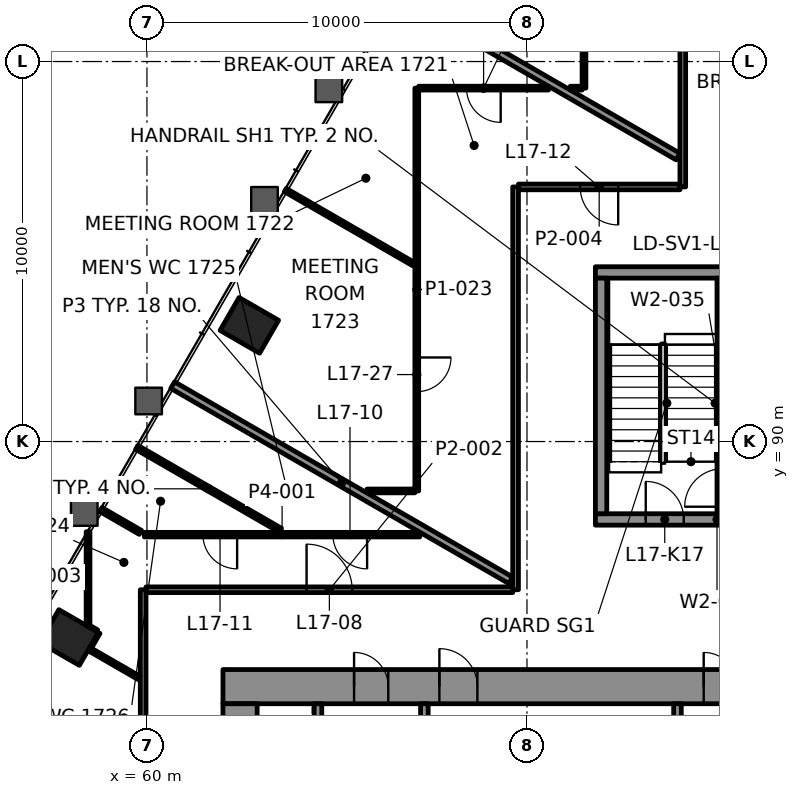
"""IFC4 building model, lengths in metres.
Left out: names, types, materials, properties, quantities, classifications, styles, units other than length and angle.
Written with IfcOpenShell. Run it as: python <this file> out.ifc"""

import sys

from ifc_helpers import new_model, si_unit, direction, frame, frame_2d, origin, origin_2d, place, context, subcontext, project, spatial, rectangle, extrude, element, fill, save


model = new_model("IFC4")
c1 = context("Model", 3, precision=1e-05, world=origin(), true_north=direction((0.0, 1.0)))
c2 = subcontext(c1, "Body", "Model", "MODEL_VIEW")
j1 = project(units=[si_unit("LENGTHUNIT", "METRE"), si_unit("PLANEANGLEUNIT", "RADIAN")], contexts=[c1])
p1 = place(None, origin())
s1 = spatial("IfcSite", under=j1, at=p1, CompositionType="ELEMENT")
p2 = place(p1, origin())
s2 = spatial("IfcBuilding", under=s1, at=p2, CompositionType="ELEMENT")
p3 = place(p2, frame((0.0, 0.0, 77.8)))
s3 = spatial("IfcBuildingStorey", under=s2, at=p3, CompositionType="ELEMENT", Elevation=77.8)
for number, where, z_axis, x_axis in (
    (1, (62.694, 93.057, -0.0), (0.0, 0.0, 1.0), (-0.5, -0.866, 0.0)),
    (2, (57.951, 84.843, -0.0), (0.0, 0.0, 1.0), (-0.5, -0.866, 0.0)),
):
    element("IfcColumn", number, at=place(p3, frame(where, z_axis=z_axis, x_axis=x_axis)), inside=s3, PredefinedType="COLUMN", context=c2, shape_type="SweptSolid", body=[
        extrude(rectangle(XDim=1.0, YDim=1.2, at=origin_2d()), origin(), (0.0, 0.0, 1.0), 4.2),
    ])
p4 = place(p3, frame((62.0, 83.55, 0.0), z_axis=(0.0, 0.0, 1.0), x_axis=(1.0, 0.0, 0.0)))
e3 = element("IfcWall", 3, at=p4, inside=s3, PredefinedType="SHEAR", context=c2, shape_type="SweptSolid", body=[
    extrude(rectangle(XDim=26.0, YDim=0.9, at=frame_2d((13.0, 0.0))), origin(), (0.0, 0.0, 1.0), 4.0),
])
p5 = place(p4, frame((5.695, 0.0, 0.0)))
e4 = element("IfcOpeningElement", 4, at=p5, cuts=e3, PredefinedType="OPENING", context=c2, shape_type="SweptSolid", body=[
    extrude(rectangle(XDim=1.0, YDim=2.1, at=frame_2d((0.5, 1.05))), frame((0.0, 0.46, 0.0), z_axis=(0.0, -1.0, 0.0), x_axis=(1.0, 0.0, 0.0)), (0.0, 0.0, 1.0), 0.92),
])
p6 = place(p4, frame((19.505, 0.0, 0.0)))
e5 = element("IfcOpeningElement", 5, at=p6, cuts=e3, PredefinedType="OPENING", context=c2, shape_type="SweptSolid", body=[
    extrude(rectangle(XDim=1.0, YDim=2.1, at=frame_2d((0.5, 1.05))), frame((0.0, 0.46, 0.0), z_axis=(0.0, -1.0, 0.0), x_axis=(1.0, 0.0, 0.0)), (0.0, 0.0, 1.0), 0.92),
])
p7 = place(p4, frame((3.45, 0.0, 0.0)))
e6 = element("IfcOpeningElement", 6, at=p7, cuts=e3, PredefinedType="OPENING", context=c2, shape_type="SweptSolid", body=[
    extrude(rectangle(XDim=0.9, YDim=2.1, at=frame_2d((0.45, 1.05))), frame((0.0, 0.46, 0.0), z_axis=(0.0, -1.0, 0.0), x_axis=(1.0, 0.0, 0.0)), (0.0, 0.0, 1.0), 0.92),
])
p8 = place(p4, frame((12.65, 0.0, 0.0)))
e7 = element("IfcOpeningElement", 7, at=p8, cuts=e3, PredefinedType="OPENING", context=c2, shape_type="SweptSolid", body=[
    extrude(rectangle(XDim=0.9, YDim=2.1, at=frame_2d((0.45, 1.05))), frame((0.0, 0.46, 0.0), z_axis=(0.0, -1.0, 0.0), x_axis=(1.0, 0.0, 0.0)), (0.0, 0.0, 1.0), 0.92),
])
p9 = place(p4, frame((22.55, 0.0, 0.0)))
e8 = element("IfcOpeningElement", 8, at=p9, cuts=e3, PredefinedType="OPENING", context=c2, shape_type="SweptSolid", body=[
    extrude(rectangle(XDim=0.9, YDim=2.1, at=frame_2d((0.45, 1.05))), frame((0.0, 0.46, 0.0), z_axis=(0.0, -1.0, 0.0), x_axis=(1.0, 0.0, 0.0)), (0.0, 0.0, 1.0), 0.92),
])
p10 = place(p3, frame((62.45, 66.9, 0.0), z_axis=(0.0, 0.0, 1.0), x_axis=(0.0, 1.0, 0.0)))
e9 = element("IfcWall", 9, at=p10, inside=s3, PredefinedType="SHEAR", context=c2, shape_type="SweptSolid", body=[
    extrude(rectangle(XDim=16.2, YDim=0.9, at=frame_2d((8.1, 0.0))), origin(), (0.0, 0.0, 1.0), 4.0),
])
p11 = place(p10, frame((5.5, 0.0, 0.0)))
e10 = element("IfcOpeningElement", 10, at=p11, cuts=e9, PredefinedType="OPENING", context=c2, shape_type="SweptSolid", body=[
    extrude(rectangle(XDim=1.8, YDim=2.1, at=frame_2d((0.9, 1.05))), frame((0.0, 0.46, 0.0), z_axis=(0.0, -1.0, 0.0), x_axis=(1.0, 0.0, 0.0)), (0.0, 0.0, 1.0), 0.92),
])
p12 = place(p3, frame((71.8, 87.95, 0.0), z_axis=(0.0, 0.0, 1.0), x_axis=(1.0, 0.0, 0.0)))
e11 = element("IfcWall", 11, at=p12, inside=s3, PredefinedType="SHEAR", context=c2, shape_type="SweptSolid", body=[
    extrude(rectangle(XDim=6.4, YDim=0.3, at=frame_2d((3.2, 0.0))), origin(), (0.0, 0.0, 1.0), 4.0),
])
p13 = place(p12, frame((1.325, 0.0, 0.0)))
e12 = element("IfcOpeningElement", 12, at=p13, cuts=e11, PredefinedType="OPENING", context=c2, shape_type="SweptSolid", body=[
    extrude(rectangle(XDim=1.0, YDim=2.1, at=frame_2d((0.5, 1.05))), frame((0.0, 0.16, 0.0), z_axis=(0.0, -1.0, 0.0), x_axis=(1.0, 0.0, 0.0)), (0.0, 0.0, 1.0), 0.32),
])
p14 = place(p12, frame((4.125, 0.0, 0.0)))
e13 = element("IfcOpeningElement", 13, at=p14, cuts=e11, PredefinedType="OPENING", context=c2, shape_type="SweptSolid", body=[
    extrude(rectangle(XDim=1.2, YDim=2.1, at=frame_2d((0.6, 1.05))), frame((0.0, 0.16, 0.0), z_axis=(0.0, -1.0, 0.0), x_axis=(1.0, 0.0, 0.0)), (0.0, 0.0, 1.0), 0.32),
])
p15 = place(p3, frame((71.8, 94.45, 0.0), z_axis=(0.0, 0.0, 1.0), x_axis=(1.0, 0.0, 0.0)))
e14 = element("IfcWall", 14, at=p15, inside=s3, PredefinedType="SHEAR", context=c2, shape_type="SweptSolid", body=[
    extrude(rectangle(XDim=6.4, YDim=0.3, at=frame_2d((3.2, 0.0))), origin(), (0.0, 0.0, 1.0), 4.0),
])
p16 = place(p3, frame((71.95, 88.1, 0.0), z_axis=(0.0, 0.0, 1.0), x_axis=(0.0, 1.0, 0.0)))
e15 = element("IfcWall", 15, at=p16, inside=s3, PredefinedType="SHEAR", context=c2, shape_type="SweptSolid", body=[
    extrude(rectangle(XDim=6.2, YDim=0.3, at=frame_2d((3.1, 0.0))), origin(), (0.0, 0.0, 1.0), 4.0),
])
p17 = place(p3, frame((75.15, 88.1, 0.0), z_axis=(0.0, 0.0, 1.0), x_axis=(0.0, 1.0, 0.0)))
e16 = element("IfcWall", 16, at=p17, inside=s3, PredefinedType="SHEAR", context=c2, shape_type="SweptSolid", body=[
    extrude(rectangle(XDim=6.2, YDim=0.3, at=frame_2d((3.1, 0.0))), origin(), (0.0, 0.0, 1.0), 4.0),
])
p18 = place(p17, frame((0.185, 0.0, 0.0)))
e17 = element("IfcOpeningElement", 17, at=p18, cuts=e16, PredefinedType="OPENING", context=c2, shape_type="SweptSolid", body=[
    extrude(rectangle(XDim=1.0, YDim=2.1, at=frame_2d((0.5, 1.05))), frame((0.0, 0.16, 0.0), z_axis=(0.0, -1.0, 0.0), x_axis=(1.0, 0.0, 0.0)), (0.0, 0.0, 1.0), 0.32),
])
p19 = place(p3, frame((59.976, 86.1, 0.0), z_axis=(0.0, 0.0, 1.0), x_axis=(1.0, 0.0, 0.0)))
e18 = element("IfcWall", 18, at=p19, inside=s3, PredefinedType="PARTITIONING", context=c2, shape_type="SweptSolid", body=[
    extrude(rectangle(XDim=9.649, YDim=0.15, at=frame_2d((4.825, 0.0))), origin(), (0.0, 0.0, 1.0), 3.4),
])
p20 = place(p19, frame((4.225, 0.0, 0.0)))
e19 = element("IfcOpeningElement", 19, at=p20, cuts=e18, PredefinedType="OPENING", context=c2, shape_type="SweptSolid", body=[
    extrude(rectangle(XDim=1.2, YDim=2.1, at=frame_2d((0.6, 1.05))), frame((0.0, 0.085, 0.0), z_axis=(0.0, -1.0, 0.0), x_axis=(1.0, 0.0, 0.0)), (0.0, 0.0, 1.0), 0.17),
])
p21 = place(p3, frame((67.181, 87.55, 0.0), z_axis=(0.0, 0.0, 1.0), x_axis=(-1.0, 0.0, 0.0)))
e20 = element("IfcWall", 20, at=p21, inside=s3, PredefinedType="PARTITIONING", context=c2, shape_type="SweptSolid", body=[
    extrude(rectangle(XDim=7.249, YDim=0.12, at=frame_2d((3.625, 0.0))), origin(), (0.0, 0.0, 1.0), 3.4),
])
p22 = place(p21, frame((1.388, 0.0, 0.0)))
e21 = element("IfcOpeningElement", 21, at=p22, cuts=e20, PredefinedType="OPENING", context=c2, shape_type="SweptSolid", body=[
    extrude(rectangle(XDim=0.9, YDim=2.1, at=frame_2d((0.45, 1.05))), frame((0.0, 0.07, 0.0), z_axis=(0.0, -1.0, 0.0), x_axis=(1.0, 0.0, 0.0)), (0.0, 0.0, 1.0), 0.14),
])
p23 = place(p21, frame((4.807, 0.0, 0.0)))
e22 = element("IfcOpeningElement", 22, at=p23, cuts=e20, PredefinedType="OPENING", context=c2, shape_type="SweptSolid", body=[
    extrude(rectangle(XDim=0.9, YDim=2.1, at=frame_2d((0.45, 1.05))), frame((0.0, 0.07, 0.0), z_axis=(0.0, -1.0, 0.0), x_axis=(1.0, 0.0, 0.0)), (0.0, 0.0, 1.0), 0.14),
])
p24 = place(p3, frame((65.789, 88.7, 0.0), z_axis=(0.0, 0.0, 1.0), x_axis=(1.0, 0.0, 0.0)))
e23 = element("IfcWall", 23, at=p24, inside=s3, PredefinedType="PARTITIONING", context=c2, shape_type="SweptSolid", body=[
    extrude(rectangle(XDim=1.261, YDim=0.1, at=frame_2d((0.631, 0.0))), origin(), (0.0, 0.0, 1.0), 3.4),
])
p25 = place(p3, frame((74.025, 96.7, 0.0), z_axis=(0.0, 0.0, 1.0), x_axis=(-1.0, 0.0, 0.0)))
e24 = element("IfcWall", 24, at=p25, inside=s3, PredefinedType="PARTITIONING", context=c2, shape_type="SweptSolid", body=[
    extrude(rectangle(XDim=4.25, YDim=0.15, at=frame_2d((2.125, 0.0))), origin(), (0.0, 0.0, 1.0), 3.4),
])
p26 = place(p25, frame((1.625, 0.0, 0.0)))
e25 = element("IfcOpeningElement", 25, at=p26, cuts=e24, PredefinedType="OPENING", context=c2, shape_type="SweptSolid", body=[
    extrude(rectangle(XDim=1.0, YDim=2.1, at=frame_2d((0.5, 1.05))), frame((0.0, 0.085, 0.0), z_axis=(0.0, -1.0, 0.0), x_axis=(1.0, 0.0, 0.0)), (0.0, 0.0, 1.0), 0.17),
])
p27 = place(p3, frame((70.567, 99.3, 0.0), z_axis=(0.0, 0.0, 1.0), x_axis=(-1.0, 0.0, 0.0)))
e26 = element("IfcWall", 26, at=p27, inside=s3, PredefinedType="PARTITIONING", context=c2, shape_type="SweptSolid", body=[
    extrude(rectangle(XDim=3.417, YDim=0.1, at=frame_2d((1.708, 0.0))), origin(), (0.0, 0.0, 1.0), 3.4),
])
p28 = place(p27, frame((1.258, 0.0, 0.0)))
e27 = element("IfcOpeningElement", 27, at=p28, cuts=e26, PredefinedType="OPENING", context=c2, shape_type="SweptSolid", body=[
    extrude(rectangle(XDim=0.9, YDim=2.1, at=frame_2d((0.45, 1.05))), frame((0.0, 0.06, 0.0), z_axis=(0.0, -1.0, 0.0), x_axis=(1.0, 0.0, 0.0)), (0.0, 0.0, 1.0), 0.12),
])
p29 = place(p3, frame((58.496, 84.587, 0.0), z_axis=(0.0, 0.0, 1.0), x_axis=(0.500114568548, 0.865959247497, 0.0)))
e28 = element("IfcWall", 28, at=p29, inside=s3, PredefinedType="PARTITIONING", context=c2, shape_type="SweptSolid", body=[
    extrude(rectangle(XDim=0.449, YDim=0.1, at=frame_2d((0.225, 0.0))), origin(), (0.0, 0.0, 1.0), 3.4),
])
p30 = place(p3, frame((74.1, 96.7, 0.0), z_axis=(0.0, 0.0, 1.0), x_axis=(0.0, 1.0, 0.0)))
e29 = element("IfcWall", 29, at=p30, inside=s3, PredefinedType="PARTITIONING", context=c2, shape_type="SweptSolid", body=[
    extrude(rectangle(XDim=9.736, YDim=0.15, at=frame_2d((4.868, 0.0))), origin(), (0.0, 0.0, 1.0), 3.4),
])
p31 = place(p30, frame((4.629, 0.0, 0.0)))
e30 = element("IfcOpeningElement", 30, at=p31, cuts=e29, PredefinedType="OPENING", context=c2, shape_type="SweptSolid", body=[
    extrude(rectangle(XDim=1.0, YDim=2.1, at=frame_2d((0.5, 1.05))), frame((0.0, 0.085, 0.0), z_axis=(0.0, -1.0, 0.0), x_axis=(1.0, 0.0, 0.0)), (0.0, 0.0, 1.0), 0.17),
])
p32 = place(p3, frame((71.5, 104.801, 0.0), z_axis=(0.0, 0.0, 1.0), x_axis=(0.0, -1.0, 0.0)))
e31 = element("IfcWall", 31, at=p32, inside=s3, PredefinedType="PARTITIONING", context=c2, shape_type="SweptSolid", body=[
    extrude(rectangle(XDim=5.501, YDim=0.1, at=frame_2d((2.75, 0.0))), origin(), (0.0, 0.0, 1.0), 3.4),
])
p33 = place(p32, frame((2.301, 0.0, 0.0)))
e32 = element("IfcOpeningElement", 32, at=p33, cuts=e31, PredefinedType="OPENING", context=c2, shape_type="SweptSolid", body=[
    extrude(rectangle(XDim=0.9, YDim=2.1, at=frame_2d((0.45, 1.05))), frame((0.0, 0.06, 0.0), z_axis=(0.0, -1.0, 0.0), x_axis=(1.0, 0.0, 0.0)), (0.0, 0.0, 1.0), 0.12),
])
p34 = place(p3, frame((69.7, 86.1, 0.0), z_axis=(0.0, 0.0, 1.0), x_axis=(0.0, 1.0, 0.0)))
e33 = element("IfcWall", 33, at=p34, inside=s3, PredefinedType="PARTITIONING", context=c2, shape_type="SweptSolid", body=[
    extrude(rectangle(XDim=10.6, YDim=0.15, at=frame_2d((5.3, 0.0))), origin(), (0.0, 0.0, 1.0), 3.4),
])
p35 = place(p3, frame((67.1, 99.3, 0.0), z_axis=(0.0, 0.0, 1.0), x_axis=(0.0, -1.0, 0.0)))
e34 = element("IfcWall", 34, at=p35, inside=s3, PredefinedType="PARTITIONING", context=c2, shape_type="SweptSolid", body=[
    extrude(rectangle(XDim=10.6, YDim=0.1, at=frame_2d((5.3, 0.0))), origin(), (0.0, 0.0, 1.0), 3.4),
])
p36 = place(p35, frame((7.088, 0.0, 0.0)))
e35 = element("IfcOpeningElement", 35, at=p36, cuts=e34, PredefinedType="OPENING", context=c2, shape_type="SweptSolid", body=[
    extrude(rectangle(XDim=0.9, YDim=2.1, at=frame_2d((0.45, 1.05))), frame((0.0, 0.06, 0.0), z_axis=(0.0, -1.0, 0.0), x_axis=(1.0, 0.0, 0.0)), (0.0, 0.0, 1.0), 0.12),
])
p37 = place(p3, frame((59.9, 67.321, 0.0), z_axis=(0.0, 0.0, 1.0), x_axis=(0.0, 1.0, 0.0)))
e36 = element("IfcWall", 36, at=p37, inside=s3, PredefinedType="PARTITIONING", context=c2, shape_type="SweptSolid", body=[
    extrude(rectangle(XDim=18.778, YDim=0.15, at=frame_2d((9.389, 0.0))), origin(), (0.0, 0.0, 1.0), 3.4),
])
p38 = place(p3, frame((58.45, 85.133, 0.0), z_axis=(0.0, 0.0, 1.0), x_axis=(0.0, 1.0, 0.0)))
e37 = element("IfcWall", 37, at=p38, inside=s3, PredefinedType="PARTITIONING", context=c2, shape_type="SweptSolid", body=[
    extrude(rectangle(XDim=2.494, YDim=0.1, at=frame_2d((1.247, 0.0))), origin(), (0.0, 0.0, 1.0), 3.165),
])
p39 = place(p3, frame((73.973, 97.499, 0.0), z_axis=(0.0, 0.0, 1.0), x_axis=(-0.866037536751, 0.499978984496, 0.0)))
e38 = element("IfcWall", 38, at=p39, inside=s3, PredefinedType="PARTITIONING", context=c2, shape_type="SweptSolid", body=[
    extrude(rectangle(XDim=6.948, YDim=0.2, at=frame_2d((3.474, 0.0))), origin(), (0.0, 0.0, 1.0), 3.4),
])
p40 = place(p3, frame((67.024, 94.665, 0.0), z_axis=(0.0, 0.0, 1.0), x_axis=(-0.866046116492, 0.499964122822, 0.0)))
e39 = element("IfcWall", 39, at=p40, inside=s3, PredefinedType="PARTITIONING", context=c2, shape_type="SweptSolid", body=[
    extrude(rectangle(XDim=3.906, YDim=0.1, at=frame_2d((1.953, 0.0))), origin(), (0.0, 0.0, 1.0), 3.165),
])
p41 = place(p3, frame((69.573, 86.348, 0.0), z_axis=(0.0, 0.0, 1.0), x_axis=(-0.866024495625, 0.500001572974, 0.0)))
e40 = element("IfcWall", 40, at=p41, inside=s3, PredefinedType="PARTITIONING", context=c2, shape_type="SweptSolid", body=[
    extrude(rectangle(XDim=10.272, YDim=0.2, at=frame_2d((5.136, 0.0))), origin(), (0.0, 0.0, 1.0), 3.165),
])
p42 = place(p3, frame((63.512, 87.665, 0.0), z_axis=(0.0, 0.0, 1.0), x_axis=(-0.866014185868, 0.500019429497, 0.0)))
e41 = element("IfcWall", 41, at=p42, inside=s3, PredefinedType="PARTITIONING", context=c2, shape_type="SweptSolid", body=[
    extrude(rectangle(XDim=4.365, YDim=0.12, at=frame_2d((2.182, 0.0))), origin(), (0.0, 0.0, 1.0), 3.165),
])
p43 = place(p3, frame((59.828, 87.61, 0.0), z_axis=(0.0, 0.0, 1.0), x_axis=(-0.865996090227, 0.500050769134, 0.0)))
e42 = element("IfcWall", 42, at=p43, inside=s3, PredefinedType="PARTITIONING", context=c2, shape_type="SweptSolid", body=[
    extrude(rectangle(XDim=1.202, YDim=0.12, at=frame_2d((0.601, 0.0))), origin(), (0.0, 0.0, 1.0), 3.165),
])
p44 = place(p3, frame((58.677, 85.001, 0.0), z_axis=(0.0, 0.0, 1.0), x_axis=(-0.86610613113, 0.49986015006, 0.0)))
e43 = element("IfcWall", 43, at=p44, inside=s3, PredefinedType="PARTITIONING", context=c2, shape_type="SweptSolid", body=[
    extrude(rectangle(XDim=0.205, YDim=0.1, at=frame_2d((0.102, 0.0))), origin(), (0.0, 0.0, 1.0), 3.4),
])
p45 = place(p3, frame((59.799, 83.776, 0.0), z_axis=(0.0, 0.0, 1.0), x_axis=(-0.866029087811, 0.499993619025, 0.0)))
e44 = element("IfcWall", 44, at=p45, inside=s3, PredefinedType="PARTITIONING", context=c2, shape_type="SweptSolid", body=[
    extrude(rectangle(XDim=1.533, YDim=0.1, at=frame_2d((0.766, 0.0))), origin(), (0.0, 0.0, 1.0), 3.4),
])
p46 = place(p3, frame((71.14, 99.3, 0.0), z_axis=(0.0, 0.0, 1.0), x_axis=(1.0, 0.0, 0.0)))
e45 = element("IfcWall", 45, at=p46, inside=s3, PredefinedType="PARTITIONING", context=c2, shape_type="SweptSolid", body=[
    extrude(rectangle(XDim=0.31, YDim=0.1, at=frame_2d((0.155, 0.0))), origin(), (0.0, 0.0, 1.0), 3.4),
])
p47 = place(p3, frame((64.5, 77.9, 0.0), z_axis=(0.0, 0.0, 1.0), x_axis=(0.0, 1.0, 0.0)))
e46 = element("IfcWall", 46, at=p47, inside=s3, PredefinedType="PARTITIONING", context=c2, shape_type="SweptSolid", body=[
    extrude(rectangle(XDim=5.2, YDim=0.2, at=frame_2d((2.6, 0.0))), origin(), (0.0, 0.0, 1.0), 4.0),
])
for number, where, z_axis, x_axis in (
    (47, (67.3, 81.28, 0.0), (0.0, 0.0, 1.0), (0.0, 1.0, 0.0)),
    (48, (73.96, 81.28, 0.0), (0.0, 0.0, 1.0), (0.0, 1.0, 0.0)),
):
    element("IfcWall", number, at=place(p3, frame(where, z_axis=z_axis, x_axis=x_axis)), inside=s3, PredefinedType="PARTITIONING", context=c2, shape_type="SweptSolid", body=[
        extrude(rectangle(XDim=1.82, YDim=0.2, at=frame_2d((0.91, 0.0))), origin(), (0.0, 0.0, 1.0), 4.0),
    ])
p48 = place(p20, origin())
e49 = element("IfcDoor", 49, at=p48, inside=s3, OperationType="DOUBLE_DOOR_SINGLE_SWING", PredefinedType="DOOR", context=c2, shape_type="SweptSolid", body=[
    extrude(rectangle(XDim=1.2, YDim=2.1, at=frame_2d((0.6, 1.05))), frame((0.0, 0.025, 0.0), z_axis=(0.0, -1.0, 0.0), x_axis=(1.0, 0.0, 0.0)), (0.0, 0.0, 1.0), 0.05),
])
fill(e19, e49)
p49 = place(p22, origin())
e50 = element("IfcDoor", 50, at=p49, inside=s3, OperationType="SINGLE_SWING_LEFT", PredefinedType="DOOR", context=c2, shape_type="SweptSolid", body=[
    extrude(rectangle(XDim=0.9, YDim=2.1, at=frame_2d((0.45, 1.05))), frame((0.0, 0.025, 0.0), z_axis=(0.0, -1.0, 0.0), x_axis=(1.0, 0.0, 0.0)), (0.0, 0.0, 1.0), 0.05),
])
fill(e21, e50)
p50 = place(p23, origin())
e51 = element("IfcDoor", 51, at=p50, inside=s3, OperationType="SINGLE_SWING_RIGHT", PredefinedType="DOOR", context=c2, shape_type="SweptSolid", body=[
    extrude(rectangle(XDim=0.9, YDim=2.1, at=frame_2d((0.45, 1.05))), frame((0.0, 0.025, 0.0), z_axis=(0.0, -1.0, 0.0), x_axis=(1.0, 0.0, 0.0)), (0.0, 0.0, 1.0), 0.05),
])
fill(e22, e51)
p51 = place(p26, origin())
e52 = element("IfcDoor", 52, at=p51, inside=s3, OperationType="SINGLE_SWING_LEFT", PredefinedType="DOOR", context=c2, shape_type="SweptSolid", body=[
    extrude(rectangle(XDim=1.0, YDim=2.1, at=frame_2d((0.5, 1.05))), frame((0.0, 0.025, 0.0), z_axis=(0.0, -1.0, 0.0), x_axis=(1.0, 0.0, 0.0)), (0.0, 0.0, 1.0), 0.05),
])
fill(e25, e52)
p52 = place(p28, origin())
e53 = element("IfcDoor", 53, at=p52, inside=s3, OperationType="SINGLE_SWING_RIGHT", PredefinedType="DOOR", context=c2, shape_type="SweptSolid", body=[
    extrude(rectangle(XDim=0.9, YDim=2.1, at=frame_2d((0.45, 1.05))), frame((0.0, 0.025, 0.0), z_axis=(0.0, -1.0, 0.0), x_axis=(1.0, 0.0, 0.0)), (0.0, 0.0, 1.0), 0.05),
])
fill(e27, e53)
p53 = place(p36, origin())
e54 = element("IfcDoor", 54, at=p53, inside=s3, OperationType="SINGLE_SWING_LEFT", PredefinedType="DOOR", context=c2, shape_type="SweptSolid", body=[
    extrude(rectangle(XDim=0.9, YDim=2.1, at=frame_2d((0.45, 1.05))), frame((0.0, 0.025, 0.0), z_axis=(0.0, -1.0, 0.0), x_axis=(1.0, 0.0, 0.0)), (0.0, 0.0, 1.0), 0.05),
])
fill(e35, e54)
p54 = place(p5, origin())
e55 = element("IfcDoor", 55, at=p54, inside=s3, OperationType="SINGLE_SWING_LEFT", PredefinedType="DOOR", context=c2, shape_type="SweptSolid", body=[
    extrude(rectangle(XDim=1.0, YDim=2.1, at=frame_2d((0.5, 1.05))), frame((0.0, 0.17, 0.0), z_axis=(0.0, -1.0, 0.0), x_axis=(1.0, 0.0, 0.0)), (0.0, 0.0, 1.0), 0.34),
])
fill(e4, e55)
p55 = place(p13, origin())
e56 = element("IfcDoor", 56, at=p55, inside=s3, OperationType="SINGLE_SWING_RIGHT", PredefinedType="DOOR", context=c2, shape_type="SweptSolid", body=[
    extrude(rectangle(XDim=1.0, YDim=2.1, at=frame_2d((0.5, 1.05))), frame((0.0, 0.025, 0.0), z_axis=(0.0, -1.0, 0.0), x_axis=(1.0, 0.0, 0.0)), (0.0, 0.0, 1.0), 0.05),
])
fill(e12, e56)
p56 = place(p7, origin())
e57 = element("IfcDoor", 57, at=p56, inside=s3, OperationType="SINGLE_SWING_RIGHT", PredefinedType="DOOR", context=c2, shape_type="SweptSolid", body=[
    extrude(rectangle(XDim=0.9, YDim=2.1, at=frame_2d((0.45, 1.05))), frame((0.0, 0.17, 0.0), z_axis=(0.0, -1.0, 0.0), x_axis=(1.0, 0.0, 0.0)), (0.0, 0.0, 1.0), 0.34),
])
fill(e6, e57)
p57 = place(p8, origin())
e58 = element("IfcDoor", 58, at=p57, inside=s3, OperationType="SINGLE_SWING_LEFT", PredefinedType="DOOR", context=c2, shape_type="SweptSolid", body=[
    extrude(rectangle(XDim=0.9, YDim=2.1, at=frame_2d((0.45, 1.05))), frame((0.0, 0.17, 0.0), z_axis=(0.0, -1.0, 0.0), x_axis=(1.0, 0.0, 0.0)), (0.0, 0.0, 1.0), 0.34),
])
fill(e7, e58)
save(model, sys.argv[1])
